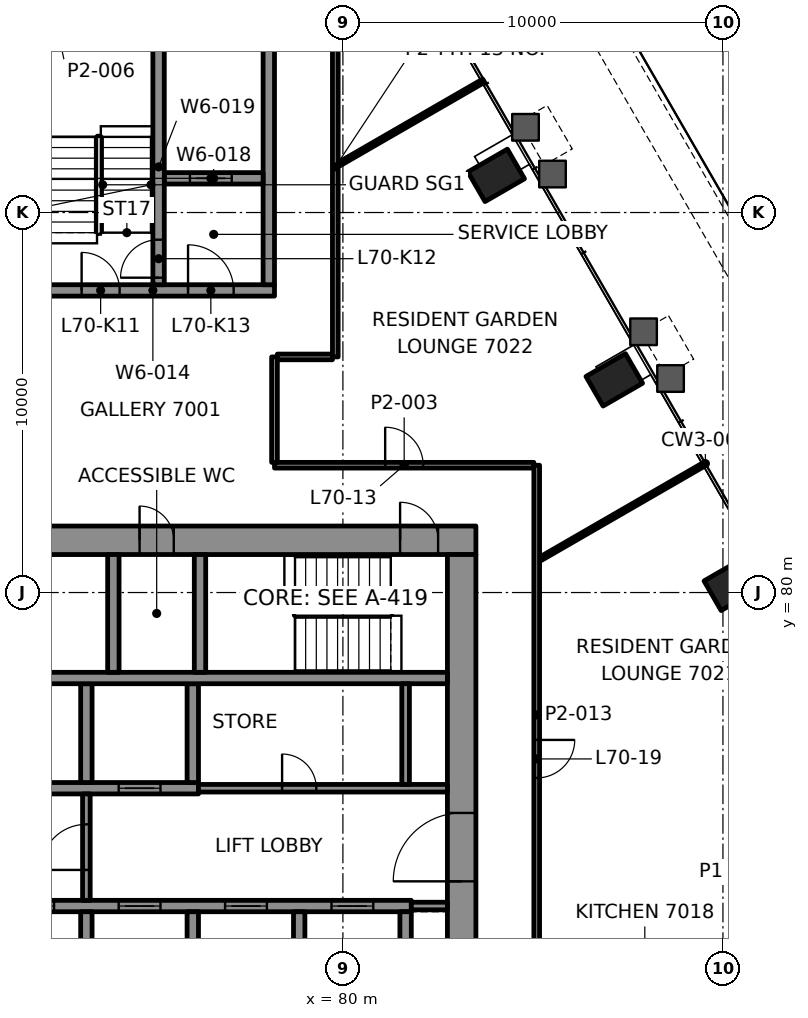
"""IFC4 building model, lengths in metres.
Left out: names, types, materials, properties, quantities, classifications, styles, units other than length and angle.
Written with IfcOpenShell. Run it as: python <this file> out.ifc"""

import sys

from ifc_helpers import new_model, si_unit, direction, frame, frame_2d, origin, origin_2d, place, context, subcontext, project, spatial, rectangle, hollow_rectangle, extrude, element, fill, save


model = new_model("IFC4")
c1 = context("Model", 3, precision=1e-05, world=origin(), true_north=direction((0.0, 1.0)))
c2 = subcontext(c1, "Body", "Model", "MODEL_VIEW")
j1 = project(units=[si_unit("LENGTHUNIT", "METRE"), si_unit("PLANEANGLEUNIT", "RADIAN")], contexts=[c1])
p1 = place(None, origin())
s1 = spatial("IfcSite", under=j1, at=p1, CompositionType="ELEMENT")
p2 = place(p1, origin())
s2 = spatial("IfcBuilding", under=s1, at=p2, CompositionType="ELEMENT")
p3 = place(p2, frame((0.0, 0.0, 291.6)))
s3 = spatial("IfcBuildingStorey", under=s2, at=p3, CompositionType="ELEMENT", Elevation=291.6)
for number, where, z_axis, x_axis in (
    (1, (90.247, 80.216, -0.0), (0.0, 0.0, 1.0), (-0.5, 0.866, 0.0)),
    (2, (87.141, 85.597, -0.0), (0.0, 0.0, 1.0), (-0.5, 0.866, 0.0)),
    (3, (84.034, 90.978, -0.0), (0.0, 0.0, 1.0), (-0.5, 0.866, 0.0)),
):
    element("IfcColumn", number, at=place(p3, frame(where, z_axis=z_axis, x_axis=x_axis)), inside=s3, PredefinedType="COLUMN", context=c2, shape_type="SweptSolid", body=[
        extrude(hollow_rectangle(XDim=0.9, YDim=1.2, WallThickness=0.06, at=origin_2d()), origin(), (0.0, 0.0, 1.0), 3.5),
    ])
p4 = place(p3, frame((66.5, 81.375, 0.0), z_axis=(0.0, 0.0, 1.0), x_axis=(1.0, 0.0, 0.0)))
e4 = element("IfcWall", 4, at=p4, inside=s3, PredefinedType="SHEAR", context=c2, shape_type="SweptSolid", body=[
    extrude(rectangle(XDim=17.0, YDim=0.75, at=frame_2d((8.5, 0.0))), origin(), (0.0, 0.0, 1.0), 3.3),
])
p5 = place(p4, frame((1.195, 0.0, 0.0)))
e5 = element("IfcOpeningElement", 5, at=p5, cuts=e4, PredefinedType="OPENING", context=c2, shape_type="SweptSolid", body=[
    extrude(rectangle(XDim=1.0, YDim=2.1, at=frame_2d((0.5, 1.05))), frame((0.0, 0.385, 0.0), z_axis=(0.0, -1.0, 0.0), x_axis=(1.0, 0.0, 0.0)), (0.0, 0.0, 1.0), 0.77),
])
p6 = place(p4, frame((15.005, 0.0, 0.0)))
e6 = element("IfcOpeningElement", 6, at=p6, cuts=e4, PredefinedType="OPENING", context=c2, shape_type="SweptSolid", body=[
    extrude(rectangle(XDim=1.0, YDim=2.1, at=frame_2d((0.5, 1.05))), frame((0.0, 0.385, 0.0), z_axis=(0.0, -1.0, 0.0), x_axis=(1.0, 0.0, 0.0)), (0.0, 0.0, 1.0), 0.77),
])
p7 = place(p4, frame((8.15, 0.0, 0.0)))
e7 = element("IfcOpeningElement", 7, at=p7, cuts=e4, PredefinedType="OPENING", context=c2, shape_type="SweptSolid", body=[
    extrude(rectangle(XDim=0.9, YDim=2.1, at=frame_2d((0.45, 1.05))), frame((0.0, 0.385, 0.0), z_axis=(0.0, -1.0, 0.0), x_axis=(1.0, 0.0, 0.0)), (0.0, 0.0, 1.0), 0.77),
])
p8 = place(p3, frame((83.125, 69.0, 0.0), z_axis=(0.0, 0.0, 1.0), x_axis=(0.0, 1.0, 0.0)))
e8 = element("IfcWall", 8, at=p8, inside=s3, PredefinedType="SHEAR", context=c2, shape_type="SweptSolid", body=[
    extrude(rectangle(XDim=12.0, YDim=0.75, at=frame_2d((6.0, 0.0))), origin(), (0.0, 0.0, 1.0), 3.3),
])
p9 = place(p8, frame((3.4, 0.0, 0.0)))
e9 = element("IfcOpeningElement", 9, at=p9, cuts=e8, PredefinedType="OPENING", context=c2, shape_type="SweptSolid", body=[
    extrude(rectangle(XDim=1.8, YDim=2.1, at=frame_2d((0.9, 1.05))), frame((0.0, 0.385, 0.0), z_axis=(0.0, -1.0, 0.0), x_axis=(1.0, 0.0, 0.0)), (0.0, 0.0, 1.0), 0.77),
])
p10 = place(p3, frame((70.3, 71.75, 0.0), z_axis=(0.0, 0.0, 1.0), x_axis=(1.0, 0.0, 0.0)))
e10 = element("IfcWall", 10, at=p10, inside=s3, PredefinedType="SHEAR", context=c2, shape_type="SweptSolid", body=[
    extrude(rectangle(XDim=11.5, YDim=0.3, at=frame_2d((5.75, 0.0))), origin(), (0.0, 0.0, 1.0), 3.3),
])
p11 = place(p10, frame((1.0, 0.0, 0.0)))
e11 = element("IfcOpeningElement", 11, at=p11, cuts=e10, PredefinedType="OPENING", context=c2, shape_type="SweptSolid", body=[
    extrude(rectangle(XDim=1.1, YDim=2.1, at=frame_2d((0.55, 1.05))), frame((0.0, 0.16, 0.0), z_axis=(0.0, -1.0, 0.0), x_axis=(1.0, 0.0, 0.0)), (0.0, 0.0, 1.0), 0.32),
])
p12 = place(p10, frame((3.8, 0.0, 0.0)))
e12 = element("IfcOpeningElement", 12, at=p12, cuts=e10, PredefinedType="OPENING", context=c2, shape_type="SweptSolid", body=[
    extrude(rectangle(XDim=1.1, YDim=2.1, at=frame_2d((0.55, 1.05))), frame((0.0, 0.16, 0.0), z_axis=(0.0, -1.0, 0.0), x_axis=(1.0, 0.0, 0.0)), (0.0, 0.0, 1.0), 0.32),
])
p13 = place(p10, frame((6.6, 0.0, 0.0)))
e13 = element("IfcOpeningElement", 13, at=p13, cuts=e10, PredefinedType="OPENING", context=c2, shape_type="SweptSolid", body=[
    extrude(rectangle(XDim=1.1, YDim=2.1, at=frame_2d((0.55, 1.05))), frame((0.0, 0.16, 0.0), z_axis=(0.0, -1.0, 0.0), x_axis=(1.0, 0.0, 0.0)), (0.0, 0.0, 1.0), 0.32),
])
p14 = place(p10, frame((9.4, 0.0, 0.0)))
e14 = element("IfcOpeningElement", 14, at=p14, cuts=e10, PredefinedType="OPENING", context=c2, shape_type="SweptSolid", body=[
    extrude(rectangle(XDim=1.1, YDim=2.1, at=frame_2d((0.55, 1.05))), frame((0.0, 0.16, 0.0), z_axis=(0.0, -1.0, 0.0), x_axis=(1.0, 0.0, 0.0)), (0.0, 0.0, 1.0), 0.32),
])
p15 = place(p3, frame((70.3, 74.85, 0.0), z_axis=(0.0, 0.0, 1.0), x_axis=(1.0, 0.0, 0.0)))
e15 = element("IfcWall", 15, at=p15, inside=s3, PredefinedType="SHEAR", context=c2, shape_type="SweptSolid", body=[
    extrude(rectangle(XDim=5.9, YDim=0.3, at=frame_2d((2.95, 0.0))), origin(), (0.0, 0.0, 1.0), 3.3),
])
p16 = place(p15, frame((3.8, 0.0, 0.0)))
e16 = element("IfcOpeningElement", 16, at=p16, cuts=e15, PredefinedType="OPENING", context=c2, shape_type="SweptSolid", body=[
    extrude(rectangle(XDim=1.1, YDim=2.1, at=frame_2d((0.55, 1.05))), frame((0.0, 0.16, 0.0), z_axis=(0.0, -1.0, 0.0), x_axis=(1.0, 0.0, 0.0)), (0.0, 0.0, 1.0), 0.32),
])
for number, where, z_axis, x_axis in (
    (17, (73.25, 69.0, 0.0), (0.0, 0.0, 1.0), (0.0, 1.0, 0.0)),
    (18, (73.25, 75.0, 0.0), (0.0, 0.0, 1.0), (0.0, 1.0, 0.0)),
    (19, (76.05, 69.0, 0.0), (0.0, 0.0, 1.0), (0.0, 1.0, 0.0)),
    (20, (76.05, 75.0, 0.0), (0.0, 0.0, 1.0), (0.0, 1.0, 0.0)),
    (21, (78.85, 69.0, 0.0), (0.0, 0.0, 1.0), (0.0, 1.0, 0.0)),
    (22, (81.65, 69.0, 0.0), (0.0, 0.0, 1.0), (0.0, 1.0, 0.0)),
):
    element("IfcWall", number, at=place(p3, frame(where, z_axis=z_axis, x_axis=x_axis)), inside=s3, PredefinedType="SHEAR", context=c2, shape_type="SweptSolid", body=[
        extrude(rectangle(XDim=2.6, YDim=0.3, at=frame_2d((1.3, 0.0))), origin(), (0.0, 0.0, 1.0), 3.3),
    ])
p17 = place(p3, frame((67.25, 77.75, 0.0), z_axis=(0.0, 0.0, 1.0), x_axis=(1.0, 0.0, 0.0)))
e23 = element("IfcWall", 23, at=p17, inside=s3, PredefinedType="SHEAR", context=c2, shape_type="SweptSolid", body=[
    extrude(rectangle(XDim=15.5, YDim=0.3, at=frame_2d((7.75, 0.0))), origin(), (0.0, 0.0, 1.0), 3.3),
])
p18 = place(p17, frame((0.445, 0.0, 0.0)))
e24 = element("IfcOpeningElement", 24, at=p18, cuts=e23, PredefinedType="OPENING", context=c2, shape_type="SweptSolid", body=[
    extrude(rectangle(XDim=1.0, YDim=2.1, at=frame_2d((0.5, 1.05))), frame((0.0, 0.16, 0.0), z_axis=(0.0, -1.0, 0.0), x_axis=(1.0, 0.0, 0.0)), (0.0, 0.0, 1.0), 0.32),
])
for number, where, z_axis, x_axis in (
    (25, (73.96, 77.9, 0.0), (0.0, 0.0, 1.0), (0.0, 1.0, 0.0)),
    (26, (76.24, 77.9, 0.0), (0.0, 0.0, 1.0), (0.0, 1.0, 0.0)),
):
    element("IfcWall", number, at=place(p3, frame(where, z_axis=z_axis, x_axis=x_axis)), inside=s3, PredefinedType="SHEAR", context=c2, shape_type="SweptSolid", body=[
        extrude(rectangle(XDim=3.1, YDim=0.3, at=frame_2d((1.55, 0.0))), origin(), (0.0, 0.0, 1.0), 3.3),
    ])
p19 = place(p3, frame((71.8, 87.95, 0.0), z_axis=(0.0, 0.0, 1.0), x_axis=(1.0, 0.0, 0.0)))
e27 = element("IfcWall", 27, at=p19, inside=s3, PredefinedType="SHEAR", context=c2, shape_type="SweptSolid", body=[
    extrude(rectangle(XDim=6.4, YDim=0.3, at=frame_2d((3.2, 0.0))), origin(), (0.0, 0.0, 1.0), 3.3),
])
p20 = place(p19, frame((1.325, 0.0, 0.0)))
e28 = element("IfcOpeningElement", 28, at=p20, cuts=e27, PredefinedType="OPENING", context=c2, shape_type="SweptSolid", body=[
    extrude(rectangle(XDim=1.0, YDim=2.1, at=frame_2d((0.5, 1.05))), frame((0.0, 0.16, 0.0), z_axis=(0.0, -1.0, 0.0), x_axis=(1.0, 0.0, 0.0)), (0.0, 0.0, 1.0), 0.32),
])
p21 = place(p19, frame((4.125, 0.0, 0.0)))
e29 = element("IfcOpeningElement", 29, at=p21, cuts=e27, PredefinedType="OPENING", context=c2, shape_type="SweptSolid", body=[
    extrude(rectangle(XDim=1.2, YDim=2.1, at=frame_2d((0.6, 1.05))), frame((0.0, 0.16, 0.0), z_axis=(0.0, -1.0, 0.0), x_axis=(1.0, 0.0, 0.0)), (0.0, 0.0, 1.0), 0.32),
])
p22 = place(p3, frame((78.05, 88.1, 0.0), z_axis=(0.0, 0.0, 1.0), x_axis=(0.0, 1.0, 0.0)))
e30 = element("IfcWall", 30, at=p22, inside=s3, PredefinedType="SHEAR", context=c2, shape_type="SweptSolid", body=[
    extrude(rectangle(XDim=6.2, YDim=0.3, at=frame_2d((3.1, 0.0))), origin(), (0.0, 0.0, 1.0), 3.3),
])
p23 = place(p3, frame((75.3, 90.9, 0.0), z_axis=(0.0, 0.0, 1.0), x_axis=(1.0, 0.0, 0.0)))
e31 = element("IfcWall", 31, at=p23, inside=s3, PredefinedType="SHEAR", context=c2, shape_type="SweptSolid", body=[
    extrude(rectangle(XDim=2.6, YDim=0.3, at=frame_2d((1.3, 0.0))), origin(), (0.0, 0.0, 1.0), 3.3),
])
p24 = place(p23, frame((0.675, 0.0, 0.0)))
e32 = element("IfcOpeningElement", 32, at=p24, cuts=e31, PredefinedType="OPENING", context=c2, shape_type="SweptSolid", body=[
    extrude(rectangle(XDim=1.1, YDim=2.1, at=frame_2d((0.55, 1.05))), frame((0.0, 0.16, 0.0), z_axis=(0.0, -1.0, 0.0), x_axis=(1.0, 0.0, 0.0)), (0.0, 0.0, 1.0), 0.32),
])
p25 = place(p3, frame((75.15, 88.1, 0.0), z_axis=(0.0, 0.0, 1.0), x_axis=(0.0, 1.0, 0.0)))
e33 = element("IfcWall", 33, at=p25, inside=s3, PredefinedType="SHEAR", context=c2, shape_type="SweptSolid", body=[
    extrude(rectangle(XDim=6.2, YDim=0.3, at=frame_2d((3.1, 0.0))), origin(), (0.0, 0.0, 1.0), 3.3),
])
p26 = place(p25, frame((0.185, 0.0, 0.0)))
e34 = element("IfcOpeningElement", 34, at=p26, cuts=e33, PredefinedType="OPENING", context=c2, shape_type="SweptSolid", body=[
    extrude(rectangle(XDim=1.0, YDim=2.1, at=frame_2d((0.5, 1.05))), frame((0.0, 0.16, 0.0), z_axis=(0.0, -1.0, 0.0), x_axis=(1.0, 0.0, 0.0)), (0.0, 0.0, 1.0), 0.32),
])
p27 = place(p3, frame((78.2, 83.35, 0.0), z_axis=(0.0, 0.0, 1.0), x_axis=(1.0, 0.0, 0.0)))
e35 = element("IfcWall", 35, at=p27, inside=s3, PredefinedType="PARTITIONING", context=c2, shape_type="SweptSolid", body=[
    extrude(rectangle(XDim=6.824, YDim=0.15, at=frame_2d((3.412, 0.0))), origin(), (0.0, 0.0, 1.0), 2.7),
])
p28 = place(p27, frame((2.912, 0.0, 0.0)))
e36 = element("IfcOpeningElement", 36, at=p28, cuts=e35, PredefinedType="OPENING", context=c2, shape_type="SweptSolid", body=[
    extrude(rectangle(XDim=1.0, YDim=2.1, at=frame_2d((0.5, 1.05))), frame((0.0, 0.085, 0.0), z_axis=(0.0, -1.0, 0.0), x_axis=(1.0, 0.0, 0.0)), (0.0, 0.0, 1.0), 0.17),
])
p29 = place(p3, frame((78.275, 86.2, 0.0), z_axis=(0.0, 0.0, 1.0), x_axis=(1.0, 0.0, 0.0)))
e37 = element("IfcWall", 37, at=p29, inside=s3, PredefinedType="PARTITIONING", context=c2, shape_type="SweptSolid", body=[
    extrude(rectangle(XDim=1.45, YDim=0.15, at=frame_2d((0.725, 0.0))), origin(), (0.0, 0.0, 1.0), 2.7),
])
p30 = place(p3, frame((87.645, 68.855, 0.0), z_axis=(0.0, 0.0, 1.0), x_axis=(0.866023307551, 0.500003630766, 0.0)))
e38 = element("IfcWall", 38, at=p30, inside=s3, PredefinedType="PARTITIONING", context=c2, shape_type="SweptSolid", body=[
    extrude(rectangle(XDim=8.894, YDim=0.1, at=frame_2d((4.447, 0.0))), origin(), (0.0, 0.0, 1.0), 2.688),
])
p31 = place(p3, frame((85.201, 80.89, 0.0), z_axis=(0.0, 0.0, 1.0), x_axis=(0.866025995923, 0.499998974385, 0.0)))
e39 = element("IfcWall", 39, at=p31, inside=s3, PredefinedType="PARTITIONING", context=c2, shape_type="SweptSolid", body=[
    extrude(rectangle(XDim=4.993, YDim=0.1, at=frame_2d((2.497, 0.0))), origin(), (0.0, 0.0, 1.0), 2.688),
])
p32 = place(p3, frame((79.901, 91.274, 0.0), z_axis=(0.0, 0.0, 1.0), x_axis=(0.86602077629, 0.50000801497, 0.0)))
e40 = element("IfcWall", 40, at=p32, inside=s3, PredefinedType="PARTITIONING", context=c2, shape_type="SweptSolid", body=[
    extrude(rectangle(XDim=4.391, YDim=0.1, at=frame_2d((2.196, 0.0))), origin(), (0.0, 0.0, 1.0), 2.7),
])
p33 = place(p3, frame((85.1, 83.35, 0.0), z_axis=(0.0, 0.0, 1.0), x_axis=(0.0, -1.0, 0.0)))
e41 = element("IfcWall", 41, at=p33, inside=s3, PredefinedType="PARTITIONING", context=c2, shape_type="SweptSolid", body=[
    extrude(rectangle(XDim=13.142, YDim=0.15, at=frame_2d((6.571, 0.0))), origin(), (0.0, 0.0, 1.0), 2.7),
])
p34 = place(p33, frame((7.228, 0.0, 0.0)))
e42 = element("IfcOpeningElement", 42, at=p34, cuts=e41, PredefinedType="OPENING", context=c2, shape_type="SweptSolid", body=[
    extrude(rectangle(XDim=1.0, YDim=2.1, at=frame_2d((0.5, 1.05))), frame((0.0, 0.085, 0.0), z_axis=(0.0, -1.0, 0.0), x_axis=(1.0, 0.0, 0.0)), (0.0, 0.0, 1.0), 0.17),
])
p35 = place(p3, frame((79.8, 86.2, 0.0), z_axis=(0.0, 0.0, 1.0), x_axis=(0.0, 1.0, 0.0)))
e43 = element("IfcWall", 43, at=p35, inside=s3, PredefinedType="PARTITIONING", context=c2, shape_type="SweptSolid", body=[
    extrude(rectangle(XDim=9.999, YDim=0.15, at=frame_2d((5.0, 0.0))), origin(), (0.0, 0.0, 1.0), 2.7),
])
p36 = place(p3, frame((78.2, 83.425, 0.0), z_axis=(0.0, 0.0, 1.0), x_axis=(0.0, 1.0, 0.0)))
e44 = element("IfcWall", 44, at=p36, inside=s3, PredefinedType="PARTITIONING", context=c2, shape_type="SweptSolid", body=[
    extrude(rectangle(XDim=2.775, YDim=0.15, at=frame_2d((1.387, 0.0))), origin(), (0.0, 0.0, 1.0), 2.697),
])
p37 = place(p3, frame((104.039, 65.027, 0.0), z_axis=(0.0, 0.0, 1.0), x_axis=(-0.499997313161, 0.866026955026, 0.0)))
e45 = element("IfcWall", 45, at=p37, inside=s3, PredefinedType="SOLIDWALL", context=c2, shape_type="SweptSolid", body=[
    extrude(rectangle(XDim=46.312, YDim=0.8, at=frame_2d((23.156, 0.0))), origin(), (0.0, 0.0, 1.0), 0.9),
])
p38 = place(p3, frame((81.8, 71.75, 0.0), z_axis=(0.0, 0.0, 1.0), x_axis=(1.0, 0.0, 0.0)))
e46 = element("IfcWall", 46, at=p38, inside=s3, PredefinedType="PARTITIONING", context=c2, shape_type="SweptSolid", body=[
    extrude(rectangle(XDim=0.95, YDim=0.2, at=frame_2d((0.475, 0.0))), origin(), (0.0, 0.0, 1.0), 3.3),
])
p39 = place(p3, frame((76.2, 74.85, 0.0), z_axis=(0.0, 0.0, 1.0), x_axis=(1.0, 0.0, 0.0)))
e47 = element("IfcWall", 47, at=p39, inside=s3, PredefinedType="PARTITIONING", context=c2, shape_type="SweptSolid", body=[
    extrude(rectangle(XDim=6.55, YDim=0.2, at=frame_2d((3.275, 0.0))), origin(), (0.0, 0.0, 1.0), 3.3),
])
p40 = place(p39, frame((2.2, 0.0, 0.0)))
e48 = element("IfcOpeningElement", 48, at=p40, cuts=e47, PredefinedType="OPENING", context=c2, shape_type="SweptSolid", body=[
    extrude(rectangle(XDim=0.9, YDim=2.1, at=frame_2d((0.45, 1.05))), frame((0.0, 0.11, 0.0), z_axis=(0.0, -1.0, 0.0), x_axis=(1.0, 0.0, 0.0)), (0.0, 0.0, 1.0), 0.22),
])
p41 = place(p3, frame((73.25, 71.9, 0.0), z_axis=(0.0, 0.0, 1.0), x_axis=(0.0, 1.0, 0.0)))
e49 = element("IfcWall", 49, at=p41, inside=s3, PredefinedType="PARTITIONING", context=c2, shape_type="SweptSolid", body=[
    extrude(rectangle(XDim=2.8, YDim=0.2, at=frame_2d((1.4, 0.0))), origin(), (0.0, 0.0, 1.0), 3.3),
])
p42 = place(p41, frame((0.8, 0.0, 0.0)))
e50 = element("IfcOpeningElement", 50, at=p42, cuts=e49, PredefinedType="OPENING", context=c2, shape_type="SweptSolid", body=[
    extrude(rectangle(XDim=1.2, YDim=2.1, at=frame_2d((0.6, 1.05))), frame((0.0, 0.11, 0.0), z_axis=(0.0, -1.0, 0.0), x_axis=(1.0, 0.0, 0.0)), (0.0, 0.0, 1.0), 0.22),
])
p43 = place(p3, frame((81.65, 74.95, 0.0), z_axis=(0.0, 0.0, 1.0), x_axis=(0.0, 1.0, 0.0)))
e51 = element("IfcWall", 51, at=p43, inside=s3, PredefinedType="PARTITIONING", context=c2, shape_type="SweptSolid", body=[
    extrude(rectangle(XDim=2.65, YDim=0.2, at=frame_2d((1.325, 0.0))), origin(), (0.0, 0.0, 1.0), 3.3),
])
p44 = place(p28, origin())
e52 = element("IfcDoor", 52, at=p44, inside=s3, OperationType="SINGLE_SWING_LEFT", PredefinedType="DOOR", context=c2, shape_type="SweptSolid", body=[
    extrude(rectangle(XDim=1.0, YDim=2.1, at=frame_2d((0.5, 1.05))), frame((0.0, 0.025, 0.0), z_axis=(0.0, -1.0, 0.0), x_axis=(1.0, 0.0, 0.0)), (0.0, 0.0, 1.0), 0.05),
])
fill(e36, e52)
p45 = place(p34, origin())
e53 = element("IfcDoor", 53, at=p45, inside=s3, OperationType="SINGLE_SWING_LEFT", PredefinedType="DOOR", context=c2, shape_type="SweptSolid", body=[
    extrude(rectangle(XDim=1.0, YDim=2.1, at=frame_2d((0.5, 1.05))), frame((0.0, 0.025, 0.0), z_axis=(0.0, -1.0, 0.0), x_axis=(1.0, 0.0, 0.0)), (0.0, 0.0, 1.0), 0.05),
])
fill(e42, e53)
p46 = place(p11, origin())
e54 = element("IfcDoor", 54, at=p46, inside=s3, OperationType="DOUBLE_DOOR_SLIDING", PredefinedType="DOOR", context=c2, shape_type="SweptSolid", body=[
    extrude(rectangle(XDim=1.1, YDim=2.1, at=frame_2d((0.55, 1.05))), frame((0.0, 0.025, 0.0), z_axis=(0.0, -1.0, 0.0), x_axis=(1.0, 0.0, 0.0)), (0.0, 0.0, 1.0), 0.05),
])
fill(e11, e54)
p47 = place(p12, origin())
e55 = element("IfcDoor", 55, at=p47, inside=s3, OperationType="DOUBLE_DOOR_SLIDING", PredefinedType="DOOR", context=c2, shape_type="SweptSolid", body=[
    extrude(rectangle(XDim=1.1, YDim=2.1, at=frame_2d((0.55, 1.05))), frame((0.0, 0.025, 0.0), z_axis=(0.0, -1.0, 0.0), x_axis=(1.0, 0.0, 0.0)), (0.0, 0.0, 1.0), 0.05),
])
fill(e12, e55)
p48 = place(p13, origin())
e56 = element("IfcDoor", 56, at=p48, inside=s3, OperationType="DOUBLE_DOOR_SLIDING", PredefinedType="DOOR", context=c2, shape_type="SweptSolid", body=[
    extrude(rectangle(XDim=1.1, YDim=2.1, at=frame_2d((0.55, 1.05))), frame((0.0, 0.025, 0.0), z_axis=(0.0, -1.0, 0.0), x_axis=(1.0, 0.0, 0.0)), (0.0, 0.0, 1.0), 0.05),
])
fill(e13, e56)
p49 = place(p14, origin())
e57 = element("IfcDoor", 57, at=p49, inside=s3, OperationType="DOUBLE_DOOR_SLIDING", PredefinedType="DOOR", context=c2, shape_type="SweptSolid", body=[
    extrude(rectangle(XDim=1.1, YDim=2.1, at=frame_2d((0.55, 1.05))), frame((0.0, 0.025, 0.0), z_axis=(0.0, -1.0, 0.0), x_axis=(1.0, 0.0, 0.0)), (0.0, 0.0, 1.0), 0.05),
])
fill(e14, e57)
p50 = place(p16, origin())
e58 = element("IfcDoor", 58, at=p50, inside=s3, OperationType="DOUBLE_DOOR_SLIDING", PredefinedType="DOOR", context=c2, shape_type="SweptSolid", body=[
    extrude(rectangle(XDim=1.1, YDim=2.1, at=frame_2d((0.55, 1.05))), frame((0.0, 0.025, 0.0), z_axis=(0.0, -1.0, 0.0), x_axis=(1.0, 0.0, 0.0)), (0.0, 0.0, 1.0), 0.05),
])
fill(e16, e58)
p51 = place(p24, origin())
e59 = element("IfcDoor", 59, at=p51, inside=s3, OperationType="DOUBLE_DOOR_SLIDING", PredefinedType="DOOR", context=c2, shape_type="SweptSolid", body=[
    extrude(rectangle(XDim=1.1, YDim=2.1, at=frame_2d((0.55, 1.05))), frame((0.0, 0.025, 0.0), z_axis=(0.0, -1.0, 0.0), x_axis=(1.0, 0.0, 0.0)), (0.0, 0.0, 1.0), 0.05),
])
fill(e32, e59)
p52 = place(p6, origin())
e60 = element("IfcDoor", 60, at=p52, inside=s3, OperationType="SINGLE_SWING_LEFT", PredefinedType="DOOR", context=c2, shape_type="SweptSolid", body=[
    extrude(rectangle(XDim=1.0, YDim=2.1, at=frame_2d((0.5, 1.05))), frame((0.0, 0.095, 0.0), z_axis=(0.0, -1.0, 0.0), x_axis=(1.0, 0.0, 0.0)), (0.0, 0.0, 1.0), 0.19),
])
fill(e6, e60)
p53 = place(p20, origin())
e61 = element("IfcDoor", 61, at=p53, inside=s3, OperationType="SINGLE_SWING_RIGHT", PredefinedType="DOOR", context=c2, shape_type="SweptSolid", body=[
    extrude(rectangle(XDim=1.0, YDim=2.1, at=frame_2d((0.5, 1.05))), frame((0.0, 0.025, 0.0), z_axis=(0.0, -1.0, 0.0), x_axis=(1.0, 0.0, 0.0)), (0.0, 0.0, 1.0), 0.05),
])
fill(e28, e61)
p54 = place(p26, origin())
e62 = element("IfcDoor", 62, at=p54, inside=s3, OperationType="SINGLE_SWING_LEFT", PredefinedType="DOOR", context=c2, shape_type="SweptSolid", body=[
    extrude(rectangle(XDim=1.0, YDim=2.1, at=frame_2d((0.5, 1.05))), frame((0.0, 0.025, 0.0), z_axis=(0.0, -1.0, 0.0), x_axis=(1.0, 0.0, 0.0)), (0.0, 0.0, 1.0), 0.05),
])
fill(e34, e62)
p55 = place(p21, origin())
e63 = element("IfcDoor", 63, at=p55, inside=s3, OperationType="SINGLE_SWING_RIGHT", PredefinedType="DOOR", context=c2, shape_type="SweptSolid", body=[
    extrude(rectangle(XDim=1.2, YDim=2.1, at=frame_2d((0.6, 1.05))), frame((0.0, 0.025, 0.0), z_axis=(0.0, -1.0, 0.0), x_axis=(1.0, 0.0, 0.0)), (0.0, 0.0, 1.0), 0.05),
])
fill(e29, e63)
p56 = place(p42, origin())
e64 = element("IfcDoor", 64, at=p56, inside=s3, OperationType="SINGLE_SWING_LEFT", PredefinedType="DOOR", context=c2, shape_type="SweptSolid", body=[
    extrude(rectangle(XDim=1.2, YDim=2.1, at=frame_2d((0.6, 1.05))), frame((0.0, 0.025, 0.0), z_axis=(0.0, -1.0, 0.0), x_axis=(1.0, 0.0, 0.0)), (0.0, 0.0, 1.0), 0.05),
])
fill(e50, e64)
p57 = place(p9, origin())
e65 = element("IfcDoor", 65, at=p57, inside=s3, OperationType="SINGLE_SWING_LEFT", PredefinedType="DOOR", context=c2, shape_type="SweptSolid", body=[
    extrude(rectangle(XDim=1.8, YDim=2.1, at=frame_2d((0.9, 1.05))), frame((0.0, 0.095, 0.0), z_axis=(0.0, -1.0, 0.0), x_axis=(1.0, 0.0, 0.0)), (0.0, 0.0, 1.0), 0.19),
])
fill(e9, e65)
p58 = place(p40, origin())
e66 = element("IfcDoor", 66, at=p58, inside=s3, OperationType="SINGLE_SWING_LEFT", PredefinedType="DOOR", context=c2, shape_type="SweptSolid", body=[
    extrude(rectangle(XDim=0.9, YDim=2.1, at=frame_2d((0.45, 1.05))), frame((0.0, 0.025, 0.0), z_axis=(0.0, -1.0, 0.0), x_axis=(1.0, 0.0, 0.0)), (0.0, 0.0, 1.0), 0.05),
])
fill(e48, e66)
p59 = place(p7, origin())
e67 = element("IfcDoor", 67, at=p59, inside=s3, OperationType="SINGLE_SWING_RIGHT", PredefinedType="DOOR", context=c2, shape_type="SweptSolid", body=[
    extrude(rectangle(XDim=0.9, YDim=2.1, at=frame_2d((0.45, 1.05))), frame((0.0, 0.095, 0.0), z_axis=(0.0, -1.0, 0.0), x_axis=(1.0, 0.0, 0.0)), (0.0, 0.0, 1.0), 0.19),
])
fill(e7, e67)
save(model, sys.argv[1])
